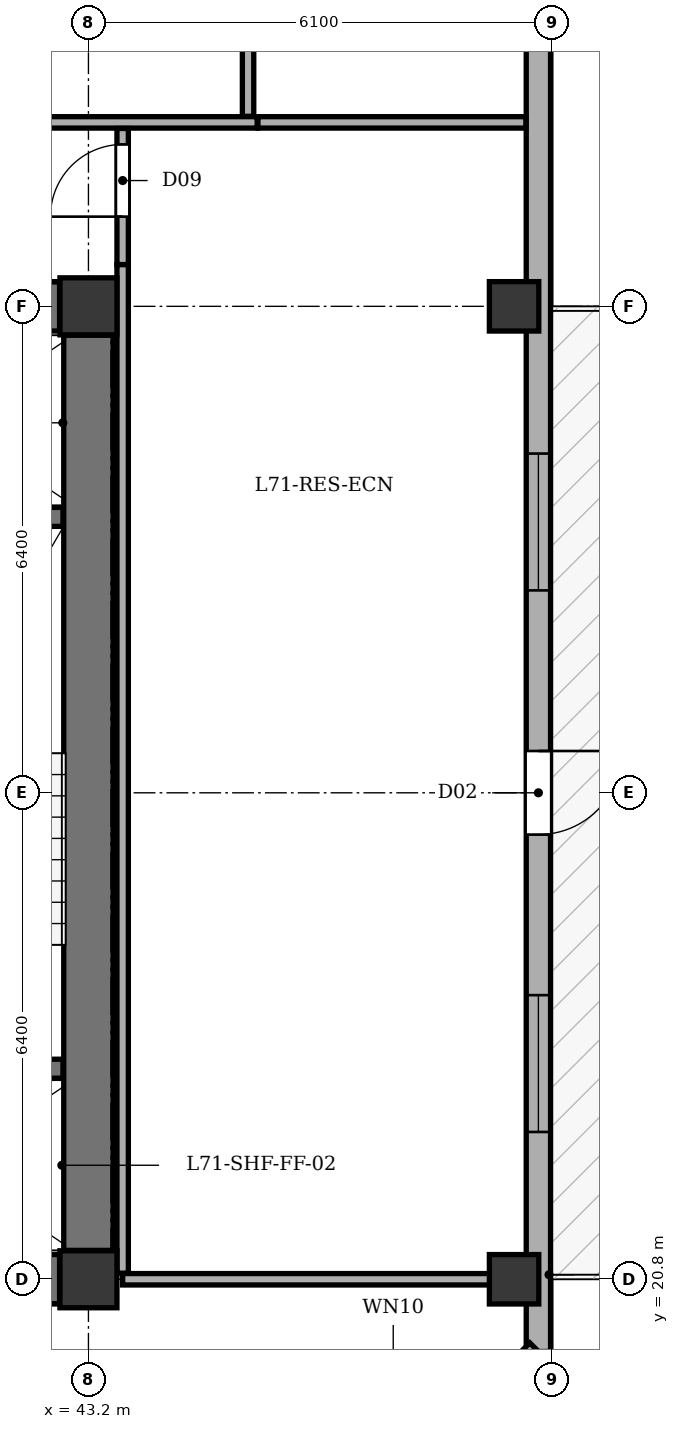
"""IFC4 building model, lengths in metres.
Left out: names, types, materials, properties, quantities, classifications, styles, units other than length and angle.
Written with IfcOpenShell. Run it as: python <this file> out.ifc"""

import sys

from ifc_helpers import new_model, si_unit, direction, frame, frame_2d, origin, origin_2d, place, context, subcontext, project, spatial, rectangle, extrude, element, fill, save


model = new_model("IFC4")
c1 = context("Model", 3, precision=1e-05, world=origin(), true_north=direction((0.0, 1.0)))
c2 = subcontext(c1, "Body", "Model", "MODEL_VIEW")
j1 = project(units=[si_unit("LENGTHUNIT", "METRE"), si_unit("PLANEANGLEUNIT", "RADIAN")], contexts=[c1])
p1 = place(None, origin())
s1 = spatial("IfcSite", under=j1, at=p1, CompositionType="ELEMENT")
p2 = place(p1, origin())
s2 = spatial("IfcBuilding", under=s1, at=p2, CompositionType="ELEMENT")
p3 = place(p2, frame((0.0, 0.0, 268.7)))
s3 = spatial("IfcBuildingStorey", under=s2, at=p3, CompositionType="ELEMENT", Elevation=268.7)
for number, where, z_axis, x_axis in (
    (1, (43.2, 20.8, 0.0), (0.0, 0.0, 1.0), (1.0, 0.0, 0.0)),
    (2, (43.2, 33.6, 0.0), (0.0, 0.0, 1.0), (1.0, 0.0, 0.0)),
):
    element("IfcColumn", number, at=place(p3, frame(where, z_axis=z_axis, x_axis=x_axis)), inside=s3, PredefinedType="COLUMN", context=c2, shape_type="SweptSolid", body=[
        extrude(rectangle(XDim=0.75, YDim=0.75, at=origin_2d()), origin(), (0.0, 0.0, 1.0), 3.4),
    ])
for number, where, z_axis, x_axis in (
    (3, (48.8, 20.8, 0.0), (0.0, 0.0, 1.0), (1.0, 0.0, 0.0)),
    (4, (48.8, 33.6, 0.0), (0.0, 0.0, 1.0), (1.0, 0.0, 0.0)),
):
    element("IfcColumn", number, at=place(p3, frame(where, z_axis=z_axis, x_axis=x_axis)), inside=s3, PredefinedType="COLUMN", context=c2, shape_type="SweptSolid", body=[
        extrude(rectangle(XDim=0.65, YDim=0.65, at=origin_2d()), origin(), (0.0, 0.0, 1.0), 3.4),
    ])
p4 = place(p3, frame((49.12, 41.1, 0.0), z_axis=(0.0, 0.0, 1.0), x_axis=(0.0, -1.0, 0.0)))
e5 = element("IfcWall", 5, at=p4, inside=s3, PredefinedType="STANDARD", context=c2, shape_type="SweptSolid", body=[
    extrude(rectangle(XDim=21.25, YDim=0.32, at=frame_2d((10.625, 0.0))), origin(), (0.0, 0.0, 1.0), 2.725),
])
p5 = place(p4, frame((13.35, 0.0, 0.0)))
e6 = element("IfcOpeningElement", 6, at=p5, cuts=e5, PredefinedType="OPENING", context=c2, shape_type="SweptSolid", body=[
    extrude(rectangle(XDim=1.1, YDim=2.05, at=frame_2d((0.55, 1.025))), frame((0.0, 0.17, 0.0), z_axis=(0.0, -1.0, 0.0), x_axis=(1.0, 0.0, 0.0)), (0.0, 0.0, 1.0), 0.34),
])
p6 = place(p4, frame((1.74, 0.0, 0.75)))
e7 = element("IfcOpeningElement", 7, at=p6, cuts=e5, PredefinedType="OPENING", context=c2, shape_type="SweptSolid", body=[
    extrude(rectangle(XDim=1.8, YDim=1.7, at=frame_2d((0.9, 0.85))), frame((0.0, 0.17, 0.0), z_axis=(0.0, -1.0, 0.0), x_axis=(1.0, 0.0, 0.0)), (0.0, 0.0, 1.0), 0.34),
])
p7 = place(p4, frame((9.437, 0.0, 0.75)))
e8 = element("IfcOpeningElement", 8, at=p7, cuts=e5, PredefinedType="OPENING", context=c2, shape_type="SweptSolid", body=[
    extrude(rectangle(XDim=1.8, YDim=1.7, at=frame_2d((0.9, 0.85))), frame((0.0, 0.17, 0.0), z_axis=(0.0, -1.0, 0.0), x_axis=(1.0, 0.0, 0.0)), (0.0, 0.0, 1.0), 0.34),
])
p8 = place(p4, frame((16.562, 0.0, 0.75)))
e9 = element("IfcOpeningElement", 9, at=p8, cuts=e5, PredefinedType="OPENING", context=c2, shape_type="SweptSolid", body=[
    extrude(rectangle(XDim=1.8, YDim=1.7, at=frame_2d((0.9, 0.85))), frame((0.0, 0.17, 0.0), z_axis=(0.0, -1.0, 0.0), x_axis=(1.0, 0.0, 0.0)), (0.0, 0.0, 1.0), 0.34),
])
p9 = place(p3, frame((49.12, 19.85, 0.0), z_axis=(0.0, 0.0, 1.0), x_axis=(-0.707106781187, -0.707106781187, 0.0)))
e10 = element("IfcWall", 10, at=p9, inside=s3, PredefinedType="STANDARD", context=c2, shape_type="SweptSolid", body=[
    extrude(rectangle(XDim=5.402, YDim=0.32, at=frame_2d((2.701, 0.0))), origin(), (0.0, 0.0, 1.0), 2.725),
])
p10 = place(p9, frame((2.001, 0.0, 0.75)))
e11 = element("IfcOpeningElement", 11, at=p10, cuts=e10, PredefinedType="OPENING", context=c2, shape_type="SweptSolid", body=[
    extrude(rectangle(XDim=1.4, YDim=1.65, at=frame_2d((0.7, 0.825))), frame((0.0, 0.17, 0.0), z_axis=(0.0, -1.0, 0.0), x_axis=(1.0, 0.0, 0.0)), (0.0, 0.0, 1.0), 0.34),
])
p11 = place(p3, frame((43.2, 21.18, 0.0), z_axis=(0.0, 0.0, 1.0), x_axis=(0.0, 1.0, 0.0)))
e12 = element("IfcWall", 12, at=p11, inside=s3, PredefinedType="SHEAR", context=c2, shape_type="SweptSolid", body=[
    extrude(rectangle(XDim=12.04, YDim=0.65, at=frame_2d((6.02, 0.0))), origin(), (0.0, 0.0, 1.0), 3.1),
])
p12 = place(p3, frame((35.58, 20.8, 0.0), z_axis=(0.0, 0.0, 1.0), x_axis=(1.0, 0.0, 0.0)))
e13 = element("IfcWall", 13, at=p12, inside=s3, PredefinedType="SHEAR", context=c2, shape_type="SweptSolid", body=[
    extrude(rectangle(XDim=7.24, YDim=0.65, at=frame_2d((3.62, 0.0))), origin(), (0.0, 0.0, 1.0), 3.1),
])
p13 = place(p3, frame((35.58, 33.6, 0.0), z_axis=(0.0, 0.0, 1.0), x_axis=(1.0, 0.0, 0.0)))
e14 = element("IfcWall", 14, at=p13, inside=s3, PredefinedType="SHEAR", context=c2, shape_type="SweptSolid", body=[
    extrude(rectangle(XDim=7.24, YDim=0.65, at=frame_2d((3.62, 0.0))), origin(), (0.0, 0.0, 1.0), 3.1),
])
p14 = place(p13, frame((4.82, 0.0, 0.0)))
e15 = element("IfcOpeningElement", 15, at=p14, cuts=e14, PredefinedType="OPENING", context=c2, shape_type="SweptSolid", body=[
    extrude(rectangle(XDim=1.3, YDim=2.15, at=frame_2d((0.65, 1.075))), frame((0.0, 0.335, 0.0), z_axis=(0.0, -1.0, 0.0), x_axis=(1.0, 0.0, 0.0)), (0.0, 0.0, 1.0), 0.67),
])
p15 = place(p13, frame((2.62, 0.0, 0.0)))
e16 = element("IfcOpeningElement", 16, at=p15, cuts=e14, PredefinedType="OPENING", context=c2, shape_type="SweptSolid", body=[
    extrude(rectangle(XDim=0.85, YDim=2.02, at=frame_2d((0.425, 1.01))), frame((0.0, 0.335, 0.0), z_axis=(0.0, -1.0, 0.0), x_axis=(1.0, 0.0, 0.0)), (0.0, 0.0, 1.0), 0.67),
])
for number, where, z_axis, x_axis in (
    (17, (39.69, 23.57, 0.0), (0.0, 0.0, 1.0), (1.0, 0.0, 0.0)),
    (18, (39.69, 30.83, 0.0), (0.0, 0.0, 1.0), (1.0, 0.0, 0.0)),
):
    element("IfcWall", number, at=place(p3, frame(where, z_axis=z_axis, x_axis=x_axis)), inside=s3, PredefinedType="SHEAR", context=c2, shape_type="SweptSolid", body=[
        extrude(rectangle(XDim=3.175, YDim=0.25, at=frame_2d((1.587, 0.0))), origin(), (0.0, 0.0, 1.0), 3.1),
    ])
p16 = place(p3, frame((10.9, 36.02, 0.0), z_axis=(0.0, 0.0, 1.0), x_axis=(1.0, 0.0, 0.0)))
e19 = element("IfcWall", 19, at=p16, inside=s3, PredefinedType="PARTITIONING", context=c2, shape_type="SweptSolid", body=[
    extrude(rectangle(XDim=34.52, YDim=0.15, at=frame_2d((17.26, 0.0))), origin(), (0.0, 0.0, 1.0), 3.1),
])
p17 = place(p16, frame((5.276, 0.0, 0.0)))
e20 = element("IfcOpeningElement", 20, at=p17, cuts=e19, PredefinedType="OPENING", context=c2, shape_type="SweptSolid", body=[
    extrude(rectangle(XDim=1.0, YDim=2.1, at=frame_2d((0.5, 1.05))), frame((0.0, 0.085, 0.0), z_axis=(0.0, -1.0, 0.0), x_axis=(1.0, 0.0, 0.0)), (0.0, 0.0, 1.0), 0.17),
])
p18 = place(p16, frame((16.931, 0.0, 0.0)))
e21 = element("IfcOpeningElement", 21, at=p18, cuts=e19, PredefinedType="OPENING", context=c2, shape_type="SweptSolid", body=[
    extrude(rectangle(XDim=1.0, YDim=2.1, at=frame_2d((0.5, 1.05))), frame((0.0, 0.085, 0.0), z_axis=(0.0, -1.0, 0.0), x_axis=(1.0, 0.0, 0.0)), (0.0, 0.0, 1.0), 0.17),
])
p19 = place(p16, frame((28.415, 0.0, 0.0)))
e22 = element("IfcOpeningElement", 22, at=p19, cuts=e19, PredefinedType="OPENING", context=c2, shape_type="SweptSolid", body=[
    extrude(rectangle(XDim=1.0, YDim=2.1, at=frame_2d((0.5, 1.05))), frame((0.0, 0.085, 0.0), z_axis=(0.0, -1.0, 0.0), x_axis=(1.0, 0.0, 0.0)), (0.0, 0.0, 1.0), 0.17),
])
p20 = place(p3, frame((45.3, 36.1, 0.0), z_axis=(0.0, 0.0, 1.0), x_axis=(0.0, 1.0, 0.0)))
e23 = element("IfcWall", 23, at=p20, inside=s3, PredefinedType="PARTITIONING", context=c2, shape_type="SweptSolid", body=[
    extrude(rectangle(XDim=8.655, YDim=0.15, at=frame_2d((4.327, 0.0))), origin(), (0.0, 0.0, 1.0), 3.1),
])
p21 = place(p3, frame((43.65, 20.8, 0.0), z_axis=(0.0, 0.0, 1.0), x_axis=(1.0, 0.0, 0.0)))
e24 = element("IfcWall", 24, at=p21, inside=s3, PredefinedType="PARTITIONING", context=c2, shape_type="SweptSolid", body=[
    extrude(rectangle(XDim=5.305, YDim=0.15, at=frame_2d((2.653, 0.0))), origin(), (0.0, 0.0, 1.0), 2.535),
])
p22 = place(p3, frame((45.43, 36.02, 0.0), z_axis=(0.0, 0.0, 1.0), x_axis=(1.0, 0.0, 0.0)))
e25 = element("IfcWall", 25, at=p22, inside=s3, PredefinedType="PARTITIONING", context=c2, shape_type="SweptSolid", body=[
    extrude(rectangle(XDim=3.525, YDim=0.15, at=frame_2d((1.763, 0.0))), origin(), (0.0, 0.0, 1.0), 3.1),
])
p23 = place(p3, frame((43.65, 20.88, 0.0), z_axis=(0.0, 0.0, 1.0), x_axis=(0.0, 1.0, 0.0)))
e26 = element("IfcWall", 26, at=p23, inside=s3, PredefinedType="PARTITIONING", context=c2, shape_type="SweptSolid", body=[
    extrude(rectangle(XDim=13.27, YDim=0.15, at=frame_2d((6.635, 0.0))), origin(), (0.0, 0.0, 1.0), 3.1),
])
p24 = place(p3, frame((43.65, 34.15, 0.0), z_axis=(0.0, 0.0, 1.0), x_axis=(0.0, 1.0, 0.0)))
e27 = element("IfcWall", 27, at=p24, inside=s3, PredefinedType="PARTITIONING", context=c2, shape_type="SweptSolid", body=[
    extrude(rectangle(XDim=1.79, YDim=0.15, at=frame_2d((0.895, 0.0))), origin(), (0.0, 0.0, 1.0), 3.1),
])
p25 = place(p24, frame((0.63, 0.0, 0.0)))
e28 = element("IfcOpeningElement", 28, at=p25, cuts=e27, PredefinedType="OPENING", context=c2, shape_type="SweptSolid", body=[
    extrude(rectangle(XDim=0.95, YDim=2.1, at=frame_2d((0.475, 1.05))), frame((0.0, 0.085, 0.0), z_axis=(0.0, -1.0, 0.0), x_axis=(1.0, 0.0, 0.0)), (0.0, 0.0, 1.0), 0.17),
])
p26 = place(p5, origin())
e29 = element("IfcDoor", 29, at=p26, inside=s3, OperationType="SINGLE_SWING_LEFT", PredefinedType="DOOR", context=c2, shape_type="SweptSolid", body=[
    extrude(rectangle(XDim=1.1, YDim=2.05, at=frame_2d((0.55, 1.025))), frame((0.0, 0.025, 0.0), z_axis=(0.0, -1.0, 0.0), x_axis=(1.0, 0.0, 0.0)), (0.0, 0.0, 1.0), 0.05),
])
fill(e6, e29)
p27 = place(p7, origin())
e30 = element("IfcWindow", 30, at=p27, inside=s3, PartitioningType="SINGLE_PANEL", PredefinedType="WINDOW", context=c2, shape_type="SweptSolid", body=[
    extrude(rectangle(XDim=1.8, YDim=1.7, at=frame_2d((0.9, 0.85))), frame((0.0, -0.01, 0.0), z_axis=(0.0, -1.0, 0.0), x_axis=(1.0, 0.0, 0.0)), (0.0, 0.0, 1.0), 0.06),
])
fill(e8, e30)
p28 = place(p8, origin())
e31 = element("IfcWindow", 31, at=p28, inside=s3, PartitioningType="SINGLE_PANEL", PredefinedType="WINDOW", context=c2, shape_type="SweptSolid", body=[
    extrude(rectangle(XDim=1.8, YDim=1.7, at=frame_2d((0.9, 0.85))), frame((0.0, -0.01, 0.0), z_axis=(0.0, -1.0, 0.0), x_axis=(1.0, 0.0, 0.0)), (0.0, 0.0, 1.0), 0.06),
])
fill(e9, e31)
p29 = place(p25, origin())
e32 = element("IfcDoor", 32, at=p29, inside=s3, OperationType="SINGLE_SWING_LEFT", PredefinedType="DOOR", context=c2, shape_type="SweptSolid", body=[
    extrude(rectangle(XDim=0.95, YDim=2.1, at=frame_2d((0.475, 1.05))), frame((0.0, 0.025, 0.0), z_axis=(0.0, -1.0, 0.0), x_axis=(1.0, 0.0, 0.0)), (0.0, 0.0, 1.0), 0.05),
])
fill(e28, e32)
save(model, sys.argv[1])
